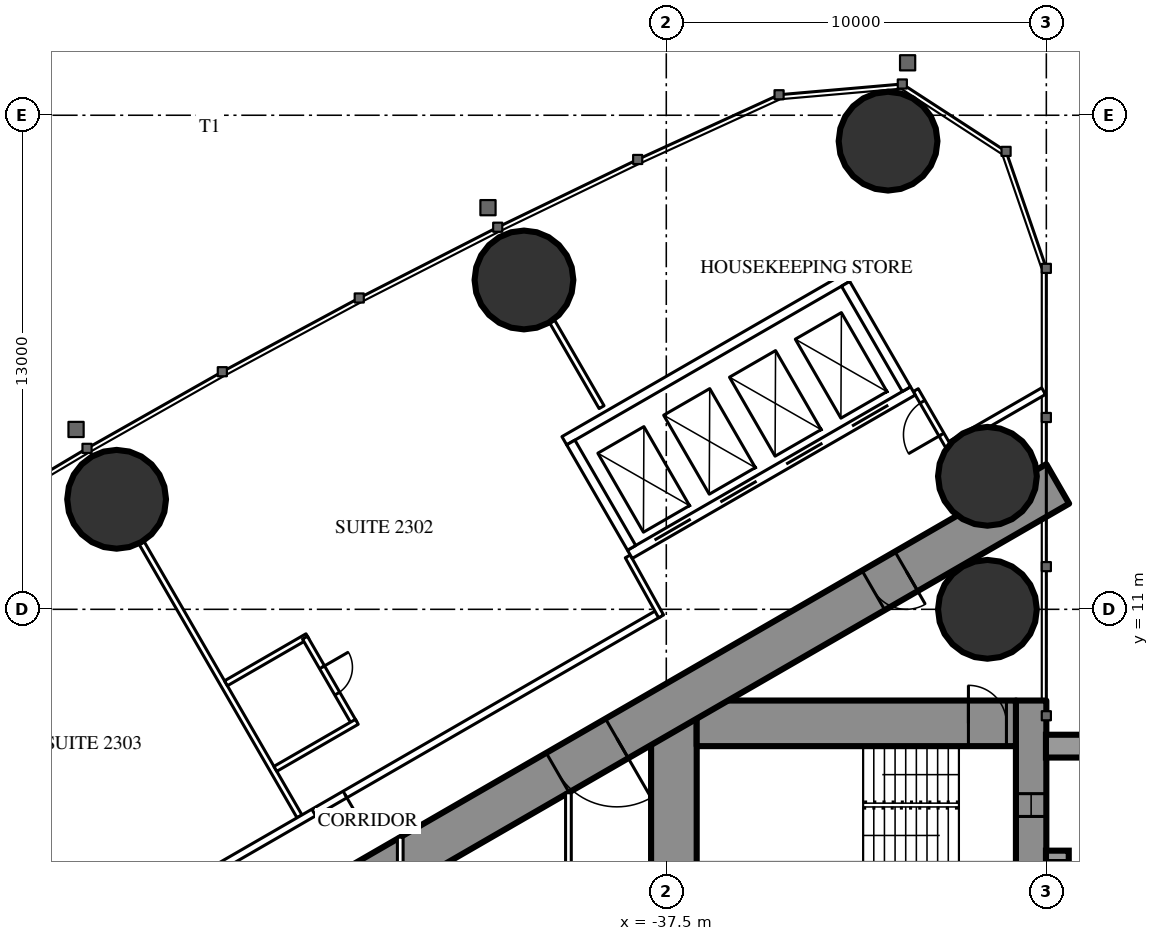
"""IFC4 building model, lengths in metres.
Left out: names, types, materials, properties, quantities, classifications, styles, units other than length and angle.
Written with IfcOpenShell. Run it as: python <this file> out.ifc"""

import sys

from ifc_helpers import new_model, si_unit, direction, frame, frame_2d, origin, origin_2d, place, context, subcontext, project, spatial, rectangle, hollow_circle, extrude, element, fill, save


model = new_model("IFC4")
c1 = context("Model", 3, precision=1e-05, world=origin(), true_north=direction((0.0, 1.0)))
c2 = subcontext(c1, "Body", "Model", "MODEL_VIEW")
j1 = project(units=[si_unit("LENGTHUNIT", "METRE"), si_unit("PLANEANGLEUNIT", "RADIAN")], contexts=[c1])
p1 = place(None, origin())
s1 = spatial("IfcSite", under=j1, at=p1, CompositionType="ELEMENT")
p2 = place(p1, origin())
s2 = spatial("IfcBuilding", under=s1, at=p2, CompositionType="ELEMENT")
p3 = place(p2, frame((0.0, 0.0, 90.6)))
s3 = spatial("IfcBuildingStorey", under=s2, at=p3, CompositionType="ELEMENT", Elevation=90.6)
for number, where, z_axis, x_axis in (
    (1, (-31.665, 23.318, 0.0), (0.0, 0.0, 1.0), (1.0, 0.0, 0.0)),
    (2, (-29.05, 11.0, 0.0), (0.0, 0.0, 1.0), (1.0, 0.0, 0.0)),
    (3, (-29.05, 14.5, 0.0), (0.0, 0.0, 1.0), (1.0, 0.0, 0.0)),
    (4, (-41.245, 19.666, 0.0), (0.0, 0.0, 1.0), (1.0, 0.0, 0.0)),
    (5, (-51.963, 13.895, 0.0), (0.0, 0.0, 1.0), (1.0, 0.0, 0.0)),
):
    element("IfcColumn", number, at=place(p3, frame(where, z_axis=z_axis, x_axis=x_axis)), inside=s3, PredefinedType="COLUMN", context=c2, shape_type="SweptSolid", body=[
        extrude(hollow_circle(Radius=1.3, WallThickness=0.1, at=origin_2d()), origin(), (0.0, 0.0, 1.0), 3.5),
    ])
p4 = place(p3, frame((-27.9, 8.6, 0.0), z_axis=(0.0, 0.0, 1.0), x_axis=(0.0, -1.0, 0.0)))
e6 = element("IfcWall", 6, at=p4, inside=s3, PredefinedType="SHEAR", context=c2, shape_type="SweptSolid", body=[
    extrude(rectangle(XDim=17.2, YDim=0.8, at=frame_2d((8.6, 0.0))), origin(), (0.0, 0.0, 1.0), 3.5),
])
p5 = place(p4, frame((2.45, 0.0, 0.6)))
e7 = element("IfcOpeningElement", 7, at=p5, cuts=e6, PredefinedType="OPENING", context=c2, shape_type="SweptSolid", body=[
    extrude(rectangle(XDim=0.6, YDim=2.1, at=frame_2d((0.3, 1.05))), frame((0.0, 0.41, 0.0), z_axis=(0.0, -1.0, 0.0), x_axis=(1.0, 0.0, 0.0)), (0.0, 0.0, 1.0), 0.82),
])
p6 = place(p4, frame((14.15, 0.0, 0.6)))
e8 = element("IfcOpeningElement", 8, at=p6, cuts=e6, PredefinedType="OPENING", context=c2, shape_type="SweptSolid", body=[
    extrude(rectangle(XDim=0.6, YDim=2.1, at=frame_2d((0.3, 1.05))), frame((0.0, 0.41, 0.0), z_axis=(0.0, -1.0, 0.0), x_axis=(1.0, 0.0, 0.0)), (0.0, 0.0, 1.0), 0.82),
])
p7 = place(p3, frame((-37.3, 8.6, 0.0), z_axis=(0.0, 0.0, 1.0), x_axis=(0.0, -1.0, 0.0)))
e9 = element("IfcWall", 9, at=p7, inside=s3, PredefinedType="SHEAR", context=c2, shape_type="SweptSolid", body=[
    extrude(rectangle(XDim=17.2, YDim=1.2, at=frame_2d((8.6, 0.0))), origin(), (0.0, 0.0, 1.0), 3.5),
])
p8 = place(p7, frame((7.7, 0.0, 0.0)))
e10 = element("IfcOpeningElement", 10, at=p8, cuts=e9, PredefinedType="OPENING", context=c2, shape_type="SweptSolid", body=[
    extrude(rectangle(XDim=1.8, YDim=2.2, at=frame_2d((0.9, 1.1))), frame((0.0, 0.61, 0.0), z_axis=(0.0, -1.0, 0.0), x_axis=(1.0, 0.0, 0.0)), (0.0, 0.0, 1.0), 1.22),
])
p9 = place(p3, frame((-28.3, 8.0, 0.0), z_axis=(0.0, 0.0, 1.0), x_axis=(-1.0, 0.0, 0.0)))
e11 = element("IfcWall", 11, at=p9, inside=s3, PredefinedType="SHEAR", context=c2, shape_type="SweptSolid", body=[
    extrude(rectangle(XDim=8.4, YDim=1.2, at=frame_2d((4.2, 0.0))), origin(), (0.0, 0.0, 1.0), 3.5),
])
p10 = place(p9, frame((0.25, 0.0, 0.0)))
e12 = element("IfcOpeningElement", 12, at=p10, cuts=e11, PredefinedType="OPENING", context=c2, shape_type="SweptSolid", body=[
    extrude(rectangle(XDim=1.0, YDim=2.2, at=frame_2d((0.5, 1.1))), frame((0.0, 0.61, 0.0), z_axis=(0.0, -1.0, 0.0), x_axis=(1.0, 0.0, 0.0)), (0.0, 0.0, 1.0), 1.22),
])
p11 = place(p3, frame((-27.2, 14.3, 0.0), z_axis=(0.0, 0.0, 1.0), x_axis=(-0.866026593062, -0.499997940104, 0.0)))
e13 = element("IfcWall", 13, at=p11, inside=s3, PredefinedType="SHEAR", context=c2, shape_type="SweptSolid", body=[
    extrude(rectangle(XDim=28.946, YDim=1.2, at=frame_2d((14.473, 0.0))), origin(), (0.0, 0.0, 1.0), 3.5),
])
p12 = place(p11, frame((4.6, 0.0, 0.0)))
e14 = element("IfcOpeningElement", 14, at=p12, cuts=e13, PredefinedType="OPENING", context=c2, shape_type="SweptSolid", body=[
    extrude(rectangle(XDim=1.0, YDim=2.2, at=frame_2d((0.5, 1.1))), frame((0.0, 0.61, 0.0), z_axis=(0.0, -1.0, 0.0), x_axis=(1.0, 0.0, 0.0)), (0.0, 0.0, 1.0), 1.22),
])
p13 = place(p11, frame((13.395, 0.0, 0.0)))
e15 = element("IfcOpeningElement", 15, at=p13, cuts=e13, PredefinedType="OPENING", context=c2, shape_type="SweptSolid", body=[
    extrude(rectangle(XDim=1.8, YDim=2.2, at=frame_2d((0.9, 1.1))), frame((0.0, 0.61, 0.0), z_axis=(0.0, -1.0, 0.0), x_axis=(1.0, 0.0, 0.0)), (0.0, 0.0, 1.0), 1.22),
])
p14 = place(p3, frame((-47.151, 5.552, 0.0), z_axis=(0.0, 0.0, 1.0), x_axis=(-0.500003012045, 0.866023664773, 0.0)))
e16 = element("IfcWall", 16, at=p14, inside=s3, PredefinedType="PARTITIONING", context=c2, shape_type="SweptSolid", body=[
    extrude(rectangle(XDim=8.311, YDim=0.15, at=frame_2d((4.156, 0.0))), origin(), (0.0, 0.0, 1.0), 2.2),
])
p15 = place(p3, frame((-39.202, 16.32, 0.0), z_axis=(0.0, 0.0, 1.0), x_axis=(-0.499947391036, 0.866055775454, 0.0)))
e17 = element("IfcWall", 17, at=p15, inside=s3, PredefinedType="PARTITIONING", context=c2, shape_type="SweptSolid", body=[
    extrude(rectangle(XDim=2.599, YDim=0.15, at=frame_2d((1.3, 0.0))), origin(), (0.0, 0.0, 1.0), 3.25),
])
p16 = place(p3, frame((-27.572, 16.741, 0.0), z_axis=(0.0, 0.0, 1.0), x_axis=(-0.866034618596, -0.499984039138, 0.0)))
e18 = element("IfcWall", 18, at=p16, inside=s3, PredefinedType="PARTITIONING", context=c2, shape_type="SweptSolid", body=[
    extrude(rectangle(XDim=2.854, YDim=0.2, at=frame_2d((1.427, 0.0))), origin(), (0.0, 0.0, 1.0), 3.25),
])
p17 = place(p3, frame((-37.7, 10.894, 0.0), z_axis=(0.0, 0.0, 1.0), x_axis=(-0.866027905338, -0.499995667157, 0.0)))
e19 = element("IfcWall", 19, at=p17, inside=s3, PredefinedType="PARTITIONING", context=c2, shape_type="SweptSolid", body=[
    extrude(rectangle(XDim=21.787, YDim=0.2, at=frame_2d((10.894, 0.0))), origin(), (0.0, 0.0, 1.0), 3.25),
])
p18 = place(p17, frame((17.887, 0.0, 0.0)))
e20 = element("IfcOpeningElement", 20, at=p18, cuts=e19, PredefinedType="OPENING", context=c2, shape_type="SweptSolid", body=[
    extrude(rectangle(XDim=0.95, YDim=2.2, at=frame_2d((0.475, 1.1))), frame((0.0, 0.11, 0.0), z_axis=(0.0, -1.0, 0.0), x_axis=(1.0, 0.0, 0.0)), (0.0, 0.0, 1.0), 0.22),
])
p19 = place(p17, frame((9.531, 0.0, 0.0)))
e21 = element("IfcOpeningElement", 21, at=p19, cuts=e19, PredefinedType="OPENING", context=c2, shape_type="SweptSolid", body=[
    extrude(rectangle(XDim=0.95, YDim=2.2, at=frame_2d((0.475, 1.1))), frame((0.0, 0.11, 0.0), z_axis=(0.0, -1.0, 0.0), x_axis=(1.0, 0.0, 0.0)), (0.0, 0.0, 1.0), 0.22),
])
p20 = place(p3, frame((-38.513, 12.392, 0.0), z_axis=(0.0, 0.0, 1.0), x_axis=(0.485585508183, -0.874189175317, 0.0)))
e22 = element("IfcWall", 22, at=p20, inside=s3, PredefinedType="PARTITIONING", context=c2, shape_type="SweptSolid", body=[
    extrude(rectangle(XDim=1.805, YDim=0.15, at=frame_2d((0.902, 0.0))), origin(), (0.0, 0.0, 1.0), 3.25),
])
p21 = place(p3, frame((-30.033, 15.205, 0.0), z_axis=(0.0, 0.0, 1.0), x_axis=(-0.499980071345, 0.866036909293, 0.0)))
e23 = element("IfcWall", 23, at=p21, inside=s3, PredefinedType="PARTITIONING", context=c2, shape_type="SweptSolid", body=[
    extrude(rectangle(XDim=1.805, YDim=0.15, at=frame_2d((0.902, 0.0))), origin(), (0.0, 0.0, 1.0), 3.25),
])
p22 = place(p21, frame((0.452, 0.0, 0.0)))
e24 = element("IfcOpeningElement", 24, at=p22, cuts=e23, PredefinedType="OPENING", context=c2, shape_type="SweptSolid", body=[
    extrude(rectangle(XDim=1.0, YDim=2.2, at=frame_2d((0.5, 1.1))), frame((0.0, 0.085, 0.0), z_axis=(0.0, -1.0, 0.0), x_axis=(1.0, 0.0, 0.0)), (0.0, 0.0, 1.0), 0.17),
])
p23 = place(p3, frame((-46.943, 10.292, 0.0), z_axis=(0.0, 0.0, 1.0), x_axis=(-0.866006523861, -0.500032699561, 0.0)))
e25 = element("IfcWall", 25, at=p23, inside=s3, PredefinedType="PARTITIONING", context=c2, shape_type="SweptSolid", body=[
    extrude(rectangle(XDim=2.475, YDim=0.15, at=frame_2d((1.237, 0.0))), origin(), (0.0, 0.0, 1.0), 3.25),
])
p24 = place(p3, frame((-45.708, 8.002, 0.0), z_axis=(0.0, 0.0, 1.0), x_axis=(-0.500047596559, 0.865997922154, 0.0)))
e26 = element("IfcWall", 26, at=p24, inside=s3, PredefinedType="PARTITIONING", context=c2, shape_type="SweptSolid", body=[
    extrude(rectangle(XDim=2.6, YDim=0.15, at=frame_2d((1.3, 0.0))), origin(), (0.0, 0.0, 1.0), 3.25),
])
p25 = place(p24, frame((0.9, 0.0, 0.0)))
e27 = element("IfcOpeningElement", 27, at=p25, cuts=e26, PredefinedType="OPENING", context=c2, shape_type="SweptSolid", body=[
    extrude(rectangle(XDim=0.8, YDim=2.2, at=frame_2d((0.4, 1.1))), frame((0.0, 0.085, 0.0), z_axis=(0.0, -1.0, 0.0), x_axis=(1.0, 0.0, 0.0)), (0.0, 0.0, 1.0), 0.17),
])
p26 = place(p3, frame((-45.643, 8.04, 0.0), z_axis=(0.0, 0.0, 1.0), x_axis=(-0.866006523861, -0.500032699561, 0.0)))
e28 = element("IfcWall", 28, at=p26, inside=s3, PredefinedType="PARTITIONING", context=c2, shape_type="SweptSolid", body=[
    extrude(rectangle(XDim=2.475, YDim=0.15, at=frame_2d((1.237, 0.0))), origin(), (0.0, 0.0, 1.0), 3.25),
])
p27 = place(p3, frame((-40.075, 6.174, 0.0), z_axis=(0.0, 0.0, 1.0), x_axis=(0.0, -1.0, 0.0)))
e29 = element("IfcWall", 29, at=p27, inside=s3, PredefinedType="PARTITIONING", context=c2, shape_type="SweptSolid", body=[
    extrude(rectangle(XDim=7.374, YDim=0.15, at=frame_2d((3.687, 0.0))), origin(), (0.0, 0.0, 1.0), 3.25),
])
p28 = place(p27, frame((2.787, 0.0, 0.0)))
e30 = element("IfcOpeningElement", 30, at=p28, cuts=e29, PredefinedType="OPENING", context=c2, shape_type="SweptSolid", body=[
    extrude(rectangle(XDim=1.8, YDim=2.2, at=frame_2d((0.9, 1.1))), frame((0.0, 0.085, 0.0), z_axis=(0.0, -1.0, 0.0), x_axis=(1.0, 0.0, 0.0)), (0.0, 0.0, 1.0), 0.17),
])
p29 = place(p3, frame((-44.5, 5.005, 0.0), z_axis=(0.0, 0.0, 1.0), x_axis=(0.0, -1.0, 0.0)))
e31 = element("IfcWall", 31, at=p29, inside=s3, PredefinedType="PARTITIONING", context=c2, shape_type="SweptSolid", body=[
    extrude(rectangle(XDim=10.009, YDim=0.15, at=frame_2d((5.005, 0.0))), origin(), (0.0, 0.0, 1.0), 2.45),
])
p30 = place(p29, frame((2.002, 0.0, 0.0)))
e32 = element("IfcOpeningElement", 32, at=p30, cuts=e31, PredefinedType="OPENING", context=c2, shape_type="SweptSolid", body=[
    extrude(rectangle(XDim=1.0, YDim=2.2, at=frame_2d((0.5, 1.1))), frame((0.0, 0.085, 0.0), z_axis=(0.0, -1.0, 0.0), x_axis=(1.0, 0.0, 0.0)), (0.0, 0.0, 1.0), 0.17),
])
p31 = place(p29, frame((7.007, 0.0, 0.0)))
e33 = element("IfcOpeningElement", 33, at=p31, cuts=e31, PredefinedType="OPENING", context=c2, shape_type="SweptSolid", body=[
    extrude(rectangle(XDim=1.0, YDim=2.2, at=frame_2d((0.5, 1.1))), frame((0.0, 0.085, 0.0), z_axis=(0.0, -1.0, 0.0), x_axis=(1.0, 0.0, 0.0)), (0.0, 0.0, 1.0), 0.17),
])
p32 = place(p3, frame((-31.01, 16.747, 0.0), z_axis=(0.0, 0.0, 1.0), x_axis=(-0.866028165386, -0.499995216735, 0.0)))
e34 = element("IfcWall", 34, at=p32, inside=s3, PredefinedType="PARTITIONING", context=c2, shape_type="SweptSolid", body=[
    extrude(rectangle(XDim=8.6, YDim=0.25, at=frame_2d((4.3, 0.0))), origin(), (0.0, 0.0, 1.0), 3.25),
])
p33 = place(p32, frame((0.75, 0.0, 0.0)))
e35 = element("IfcOpeningElement", 35, at=p33, cuts=e34, PredefinedType="OPENING", context=c2, shape_type="SweptSolid", body=[
    extrude(rectangle(XDim=1.1, YDim=2.2, at=frame_2d((0.55, 1.1))), frame((0.0, 0.135, 0.0), z_axis=(0.0, -1.0, 0.0), x_axis=(1.0, 0.0, 0.0)), (0.0, 0.0, 1.0), 0.27),
])
p34 = place(p32, frame((2.75, 0.0, 0.0)))
e36 = element("IfcOpeningElement", 36, at=p34, cuts=e34, PredefinedType="OPENING", context=c2, shape_type="SweptSolid", body=[
    extrude(rectangle(XDim=1.1, YDim=2.2, at=frame_2d((0.55, 1.1))), frame((0.0, 0.135, 0.0), z_axis=(0.0, -1.0, 0.0), x_axis=(1.0, 0.0, 0.0)), (0.0, 0.0, 1.0), 0.27),
])
p35 = place(p32, frame((4.75, 0.0, 0.0)))
e37 = element("IfcOpeningElement", 37, at=p35, cuts=e34, PredefinedType="OPENING", context=c2, shape_type="SweptSolid", body=[
    extrude(rectangle(XDim=1.1, YDim=2.2, at=frame_2d((0.55, 1.1))), frame((0.0, 0.135, 0.0), z_axis=(0.0, -1.0, 0.0), x_axis=(1.0, 0.0, 0.0)), (0.0, 0.0, 1.0), 0.27),
])
p36 = place(p32, frame((6.75, 0.0, 0.0)))
e38 = element("IfcOpeningElement", 38, at=p36, cuts=e34, PredefinedType="OPENING", context=c2, shape_type="SweptSolid", body=[
    extrude(rectangle(XDim=1.1, YDim=2.2, at=frame_2d((0.55, 1.1))), frame((0.0, 0.135, 0.0), z_axis=(0.0, -1.0, 0.0), x_axis=(1.0, 0.0, 0.0)), (0.0, 0.0, 1.0), 0.27),
])
p37 = place(p3, frame((-32.736, 19.736, 0.0), z_axis=(0.0, 0.0, 1.0), x_axis=(-0.866028165386, -0.499995216735, 0.0)))
e39 = element("IfcWall", 39, at=p37, inside=s3, PredefinedType="PARTITIONING", context=c2, shape_type="SweptSolid", body=[
    extrude(rectangle(XDim=8.6, YDim=0.25, at=frame_2d((4.3, 0.0))), origin(), (0.0, 0.0, 1.0), 3.25),
])
p38 = place(p3, frame((-31.181, 16.793, 0.0), z_axis=(0.0, 0.0, 1.0), x_axis=(-0.499929347863, 0.866066190972, 0.0)))
e40 = element("IfcWall", 40, at=p38, inside=s3, PredefinedType="PARTITIONING", context=c2, shape_type="SweptSolid", body=[
    extrude(rectangle(XDim=3.201, YDim=0.25, at=frame_2d((1.6, 0.0))), origin(), (0.0, 0.0, 1.0), 3.25),
])
p39 = place(p3, frame((-38.413, 12.618, 0.0), z_axis=(0.0, 0.0, 1.0), x_axis=(-0.499872130319, 0.866099216793, 0.0)))
e41 = element("IfcWall", 41, at=p39, inside=s3, PredefinedType="PARTITIONING", context=c2, shape_type="SweptSolid", body=[
    extrude(rectangle(XDim=3.2, YDim=0.25, at=frame_2d((1.6, 0.0))), origin(), (0.0, 0.0, 1.0), 3.25),
])
p40 = place(p25, origin())
e42 = element("IfcDoor", 42, at=p40, inside=s3, OperationType="SINGLE_SWING_RIGHT", PredefinedType="DOOR", context=c2, shape_type="SweptSolid", body=[
    extrude(rectangle(XDim=0.8, YDim=2.2, at=frame_2d((0.4, 1.1))), frame((0.0, 0.025, 0.0), z_axis=(0.0, -1.0, 0.0), x_axis=(1.0, 0.0, 0.0)), (0.0, 0.0, 1.0), 0.05),
])
fill(e27, e42)
p41 = place(p19, origin())
e43 = element("IfcDoor", 43, at=p41, inside=s3, OperationType="SINGLE_SWING_LEFT", PredefinedType="DOOR", context=c2, shape_type="SweptSolid", body=[
    extrude(rectangle(XDim=0.95, YDim=2.2, at=frame_2d((0.475, 1.1))), frame((0.0, 0.025, 0.0), z_axis=(0.0, -1.0, 0.0), x_axis=(1.0, 0.0, 0.0)), (0.0, 0.0, 1.0), 0.05),
])
fill(e21, e43)
p42 = place(p22, origin())
e44 = element("IfcDoor", 44, at=p42, inside=s3, OperationType="SINGLE_SWING_LEFT", PredefinedType="DOOR", context=c2, shape_type="SweptSolid", body=[
    extrude(rectangle(XDim=1.0, YDim=2.2, at=frame_2d((0.5, 1.1))), frame((0.0, 0.025, 0.0), z_axis=(0.0, -1.0, 0.0), x_axis=(1.0, 0.0, 0.0)), (0.0, 0.0, 1.0), 0.05),
])
fill(e24, e44)
p43 = place(p12, origin())
e45 = element("IfcDoor", 45, at=p43, inside=s3, OperationType="SINGLE_SWING_LEFT", PredefinedType="DOOR", context=c2, shape_type="SweptSolid", body=[
    extrude(rectangle(XDim=1.0, YDim=2.2, at=frame_2d((0.5, 1.1))), frame((0.0, 0.025, 0.0), z_axis=(0.0, -1.0, 0.0), x_axis=(1.0, 0.0, 0.0)), (0.0, 0.0, 1.0), 0.05),
])
fill(e14, e45)
p44 = place(p13, origin())
e46 = element("IfcDoor", 46, at=p44, inside=s3, OperationType="DOUBLE_DOOR_SINGLE_SWING", PredefinedType="DOOR", context=c2, shape_type="SweptSolid", body=[
    extrude(rectangle(XDim=1.8, YDim=2.2, at=frame_2d((0.9, 1.1))), frame((0.0, 0.025, 0.0), z_axis=(0.0, -1.0, 0.0), x_axis=(1.0, 0.0, 0.0)), (0.0, 0.0, 1.0), 0.05),
])
fill(e15, e46)
p45 = place(p10, origin())
e47 = element("IfcDoor", 47, at=p45, inside=s3, OperationType="SINGLE_SWING_RIGHT", PredefinedType="DOOR", context=c2, shape_type="SweptSolid", body=[
    extrude(rectangle(XDim=1.0, YDim=2.2, at=frame_2d((0.5, 1.1))), frame((0.0, 0.025, 0.0), z_axis=(0.0, -1.0, 0.0), x_axis=(1.0, 0.0, 0.0)), (0.0, 0.0, 1.0), 0.05),
])
fill(e12, e47)
p46 = place(p33, origin())
e48 = element("IfcDoor", 48, at=p46, inside=s3, OperationType="DOUBLE_DOOR_SLIDING", PredefinedType="USERDEFINED", context=c2, shape_type="SweptSolid", body=[
    extrude(rectangle(XDim=1.1, YDim=2.2, at=frame_2d((0.55, 1.1))), frame((0.0, 0.025, 0.0), z_axis=(0.0, -1.0, 0.0), x_axis=(1.0, 0.0, 0.0)), (0.0, 0.0, 1.0), 0.05),
])
fill(e35, e48)
p47 = place(p34, origin())
e49 = element("IfcDoor", 49, at=p47, inside=s3, OperationType="DOUBLE_DOOR_SLIDING", PredefinedType="USERDEFINED", context=c2, shape_type="SweptSolid", body=[
    extrude(rectangle(XDim=1.1, YDim=2.2, at=frame_2d((0.55, 1.1))), frame((0.0, 0.025, 0.0), z_axis=(0.0, -1.0, 0.0), x_axis=(1.0, 0.0, 0.0)), (0.0, 0.0, 1.0), 0.05),
])
fill(e36, e49)
p48 = place(p35, origin())
e50 = element("IfcDoor", 50, at=p48, inside=s3, OperationType="DOUBLE_DOOR_SLIDING", PredefinedType="USERDEFINED", context=c2, shape_type="SweptSolid", body=[
    extrude(rectangle(XDim=1.1, YDim=2.2, at=frame_2d((0.55, 1.1))), frame((0.0, 0.025, 0.0), z_axis=(0.0, -1.0, 0.0), x_axis=(1.0, 0.0, 0.0)), (0.0, 0.0, 1.0), 0.05),
])
fill(e37, e50)
p49 = place(p36, origin())
e51 = element("IfcDoor", 51, at=p49, inside=s3, OperationType="DOUBLE_DOOR_SLIDING", PredefinedType="USERDEFINED", context=c2, shape_type="SweptSolid", body=[
    extrude(rectangle(XDim=1.1, YDim=2.2, at=frame_2d((0.55, 1.1))), frame((0.0, 0.025, 0.0), z_axis=(0.0, -1.0, 0.0), x_axis=(1.0, 0.0, 0.0)), (0.0, 0.0, 1.0), 0.05),
])
fill(e38, e51)
p50 = place(p5, origin())
e52 = element("IfcWindow", 52, at=p50, inside=s3, PartitioningType="SINGLE_PANEL", PredefinedType="WINDOW", context=c2, shape_type="SweptSolid", body=[
    extrude(rectangle(XDim=0.6, YDim=2.1, at=frame_2d((0.3, 1.05))), frame((0.0, 0.03, 0.0), z_axis=(0.0, -1.0, 0.0), x_axis=(1.0, 0.0, 0.0)), (0.0, 0.0, 1.0), 0.06),
])
fill(e7, e52)
save(model, sys.argv[1])
